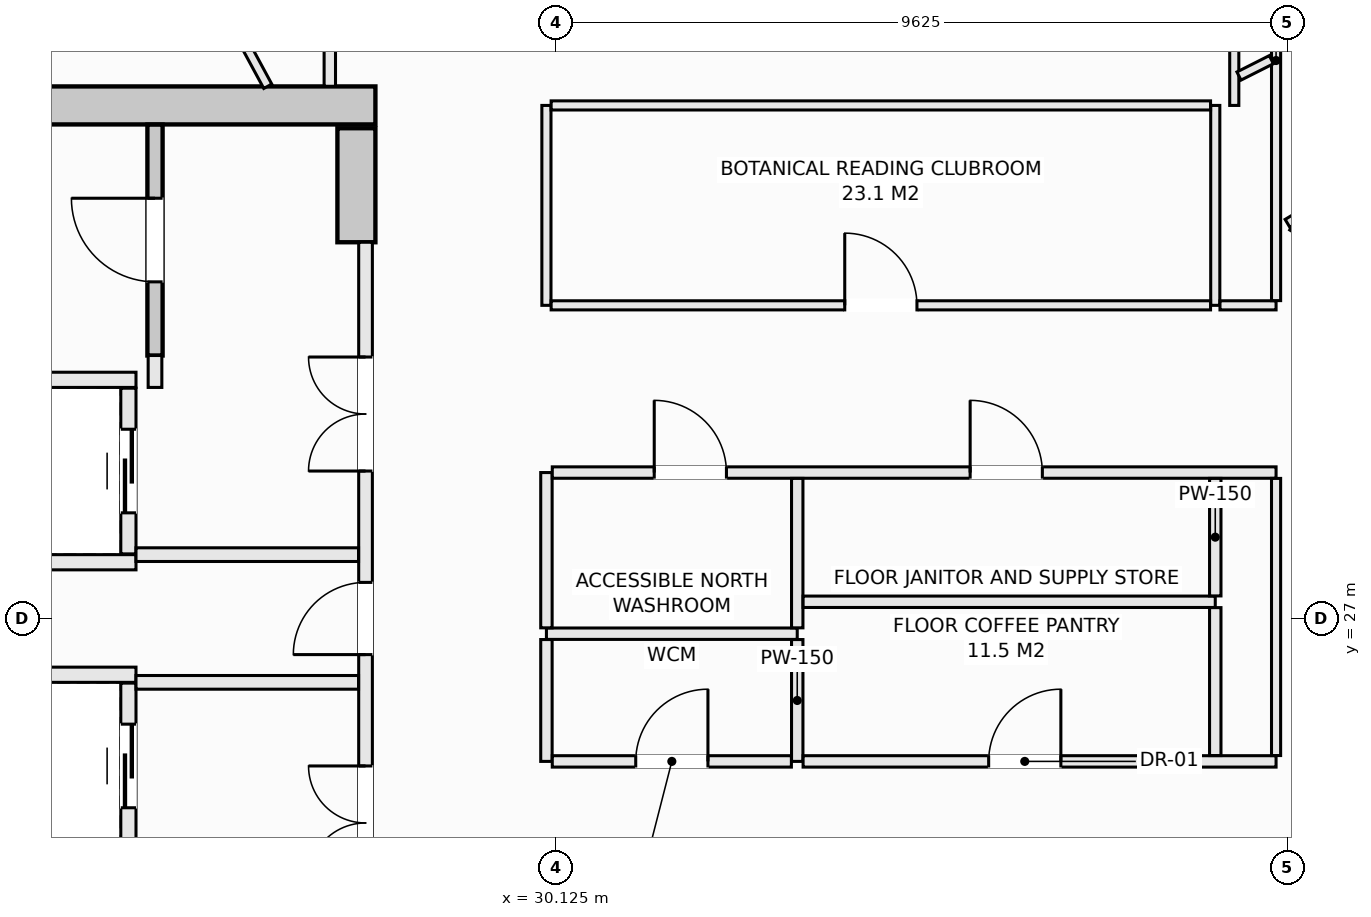
"""IFC4 building model, lengths in metres.
Left out: names, types, materials, properties, quantities, classifications, styles, units other than length and angle.
Written with IfcOpenShell. Run it as: python <this file> out.ifc"""

import sys

from ifc_helpers import new_model, si_unit, direction, frame, frame_2d, origin, place, context, subcontext, project, spatial, rectangle, extrude, element, fill, save


model = new_model("IFC4")
c1 = context("Model", 3, precision=1e-05, world=origin(), true_north=direction((0.0, 1.0)))
c2 = subcontext(c1, "Body", "Model", "MODEL_VIEW")
j1 = project(units=[si_unit("LENGTHUNIT", "METRE"), si_unit("PLANEANGLEUNIT", "RADIAN")], contexts=[c1])
p1 = place(None, origin())
s1 = spatial("IfcSite", under=j1, at=p1, CompositionType="ELEMENT")
p2 = place(p1, origin())
s2 = spatial("IfcBuilding", under=s1, at=p2, CompositionType="ELEMENT")
p3 = place(p2, frame((0.0, 0.0, 232.7)))
s3 = spatial("IfcBuildingStorey", under=s2, at=p3, CompositionType="ELEMENT", Elevation=232.7)
p4 = place(p3, frame((14.25, 33.75, -0.27), z_axis=(0.0, 0.0, 1.0), x_axis=(1.0, 0.0, 0.0)))
e1 = element("IfcWall", 1, at=p4, inside=s3, PredefinedType="SHEAR", context=c2, shape_type="SweptSolid", body=[
    extrude(rectangle(XDim=13.5, YDim=0.5, at=frame_2d((6.75, 0.0))), origin(), (0.0, 0.0, 1.0), 3.3),
])
p5 = place(p3, frame((27.5, 31.95, -0.27), z_axis=(0.0, 0.0, 1.0), x_axis=(0.0, 1.0, 0.0)))
e2 = element("IfcWall", 2, at=p5, inside=s3, PredefinedType="SHEAR", context=c2, shape_type="SweptSolid", body=[
    extrude(rectangle(XDim=1.5, YDim=0.5, at=frame_2d((0.75, 0.0))), origin(), (0.0, 0.0, 1.0), 3.3),
])
p6 = place(p3, frame((24.85, 30.46, -0.27), z_axis=(0.0, 0.0, 1.0), x_axis=(0.0, 1.0, 0.0)))
e3 = element("IfcWall", 3, at=p6, inside=s3, PredefinedType="SHEAR", context=c2, shape_type="SweptSolid", body=[
    extrude(rectangle(XDim=3.038, YDim=0.2, at=frame_2d((1.519, 0.0))), origin(), (0.0, 0.0, 1.0), 3.3),
])
p7 = place(p6, frame((0.969, 0.0, 0.27)))
e4 = element("IfcOpeningElement", 4, at=p7, cuts=e3, PredefinedType="OPENING", context=c2, shape_type="SweptSolid", body=[
    extrude(rectangle(XDim=1.1, YDim=2.15, at=frame_2d((0.55, 1.075))), frame((0.0, 0.11, 0.0), z_axis=(0.0, -1.0, 0.0), x_axis=(1.0, 0.0, 0.0)), (0.0, 0.0, 1.0), 0.22),
])
for number, where, z_axis, x_axis in (
    (5, (22.15, 30.14, 0.0), (0.0, 0.0, 1.0), (1.0, 0.0, 0.0)),
    (6, (22.15, 27.74, 0.0), (0.0, 0.0, 1.0), (1.0, 0.0, 0.0)),
):
    element("IfcWall", number, at=place(p3, frame(where, z_axis=z_axis, x_axis=x_axis)), inside=s3, PredefinedType="SOLIDWALL", context=c2, shape_type="SweptSolid", body=[
        extrude(rectangle(XDim=2.45, YDim=0.2, at=frame_2d((1.225, 0.0))), origin(), (0.0, 0.0, 1.0), 3.03),
    ])
p8 = place(p3, frame((24.5, 27.85, 0.0), z_axis=(0.0, 0.0, 1.0), x_axis=(0.0, 1.0, 0.0)))
e7 = element("IfcWall", 7, at=p8, inside=s3, PredefinedType="SOLIDWALL", context=c2, shape_type="SweptSolid", body=[
    extrude(rectangle(XDim=2.18, YDim=0.2, at=frame_2d((1.09, 0.0))), origin(), (0.0, 0.0, 1.0), 3.03),
])
p9 = place(p8, frame((0.54, 0.0, 0.0)))
e8 = element("IfcOpeningElement", 8, at=p9, cuts=e7, PredefinedType="OPENING", context=c2, shape_type="SweptSolid", body=[
    extrude(rectangle(XDim=1.1, YDim=2.2, at=frame_2d((0.55, 1.1))), frame((0.0, 0.11, 0.0), z_axis=(0.0, -1.0, 0.0), x_axis=(1.0, 0.0, 0.0)), (0.0, 0.0, 1.0), 0.22),
])
p10 = place(p3, frame((22.15, 26.26, 0.0), z_axis=(0.0, 0.0, 1.0), x_axis=(1.0, 0.0, 0.0)))
e9 = element("IfcWall", 9, at=p10, inside=s3, PredefinedType="SOLIDWALL", context=c2, shape_type="SweptSolid", body=[
    extrude(rectangle(XDim=2.45, YDim=0.2, at=frame_2d((1.225, 0.0))), origin(), (0.0, 0.0, 1.0), 3.03),
])
p11 = place(p3, frame((24.5, 23.97, 0.0), z_axis=(0.0, 0.0, 1.0), x_axis=(0.0, 1.0, 0.0)))
e10 = element("IfcWall", 10, at=p11, inside=s3, PredefinedType="SOLIDWALL", context=c2, shape_type="SweptSolid", body=[
    extrude(rectangle(XDim=2.18, YDim=0.2, at=frame_2d((1.09, 0.0))), origin(), (0.0, 0.0, 1.0), 3.03),
])
p12 = place(p11, frame((0.54, 0.0, 0.0)))
e11 = element("IfcOpeningElement", 11, at=p12, cuts=e10, PredefinedType="OPENING", context=c2, shape_type="SweptSolid", body=[
    extrude(rectangle(XDim=1.1, YDim=2.2, at=frame_2d((0.55, 1.1))), frame((0.0, 0.11, 0.0), z_axis=(0.0, -1.0, 0.0), x_axis=(1.0, 0.0, 0.0)), (0.0, 0.0, 1.0), 0.22),
])
p13 = place(p3, frame((24.85, 30.04, 0.0), z_axis=(0.0, 0.0, 1.0), x_axis=(0.0, 1.0, 0.0)))
e12 = element("IfcWall", 12, at=p13, inside=s3, PredefinedType="SOLIDWALL", context=c2, shape_type="SweptSolid", body=[
    extrude(rectangle(XDim=0.42, YDim=0.18, at=frame_2d((0.21, 0.0))), origin(), (0.0, 0.0, 1.0), 3.03),
])
p14 = place(p3, frame((27.62, 22.05, 0.0), z_axis=(0.0, 0.0, 1.0), x_axis=(0.0, 1.0, 0.0)))
e13 = element("IfcWall", 13, at=p14, inside=s3, PredefinedType="SOLIDWALL", context=c2, shape_type="SweptSolid", body=[
    extrude(rectangle(XDim=9.9, YDim=0.18, at=frame_2d((4.95, 0.0))), origin(), (0.0, 0.0, 1.0), 3.03),
])
p15 = place(p14, frame((4.475, 0.0, 0.0)))
e14 = element("IfcOpeningElement", 14, at=p15, cuts=e13, PredefinedType="OPENING", context=c2, shape_type="SweptSolid", body=[
    extrude(rectangle(XDim=0.95, YDim=2.1, at=frame_2d((0.475, 1.05))), frame((0.0, 0.1, 0.0), z_axis=(0.0, -1.0, 0.0), x_axis=(1.0, 0.0, 0.0)), (0.0, 0.0, 1.0), 0.2),
])
p16 = place(p14, frame((6.89, 0.0, 0.0)))
e15 = element("IfcOpeningElement", 15, at=p16, cuts=e13, PredefinedType="OPENING", context=c2, shape_type="SweptSolid", body=[
    extrude(rectangle(XDim=1.5, YDim=2.2, at=frame_2d((0.75, 1.1))), frame((0.0, 0.1, 0.0), z_axis=(0.0, -1.0, 0.0), x_axis=(1.0, 0.0, 0.0)), (0.0, 0.0, 1.0), 0.2),
])
p17 = place(p14, frame((1.51, 0.0, 0.0)))
e16 = element("IfcOpeningElement", 16, at=p17, cuts=e13, PredefinedType="OPENING", context=c2, shape_type="SweptSolid", body=[
    extrude(rectangle(XDim=1.5, YDim=2.2, at=frame_2d((0.75, 1.1))), frame((0.0, 0.1, 0.0), z_axis=(0.0, -1.0, 0.0), x_axis=(1.0, 0.0, 0.0)), (0.0, 0.0, 1.0), 0.2),
])
for number, where, z_axis, x_axis in (
    (17, (24.6, 27.84, 0.0), (0.0, 0.0, 1.0), (1.0, 0.0, 0.0)),
    (18, (24.6, 26.16, 0.0), (0.0, 0.0, 1.0), (1.0, 0.0, 0.0)),
):
    element("IfcWall", number, at=place(p3, frame(where, z_axis=z_axis, x_axis=x_axis)), inside=s3, PredefinedType="SOLIDWALL", context=c2, shape_type="SweptSolid", body=[
        extrude(rectangle(XDim=2.928, YDim=0.18, at=frame_2d((1.464, 0.0))), origin(), (0.0, 0.0, 1.0), 3.03),
    ])
p18 = place(p3, frame((27.15, 34.002, 0.0), z_axis=(0.0, 0.0, 1.0), x_axis=(0.0, 1.0, 0.0)))
e19 = element("IfcWall", 19, at=p18, inside=s3, PredefinedType="PARTITIONING", context=c2, shape_type="SweptSolid", body=[
    extrude(rectangle(XDim=4.198, YDim=0.15, at=frame_2d((2.099, 0.0))), origin(), (0.0, 0.0, 1.0), 3.03),
])
p19 = place(p18, frame((1.998, 0.0, 0.0)))
e20 = element("IfcOpeningElement", 20, at=p19, cuts=e19, PredefinedType="OPENING", context=c2, shape_type="SweptSolid", body=[
    extrude(rectangle(XDim=0.95, YDim=2.1, at=frame_2d((0.475, 1.05))), frame((0.0, 0.085, 0.0), z_axis=(0.0, -1.0, 0.0), x_axis=(1.0, 0.0, 0.0)), (0.0, 0.0, 1.0), 0.17),
])
p20 = place(p3, frame((30.0, 26.8, 0.0), z_axis=(0.0, 0.0, 1.0), x_axis=(1.0, 0.0, 0.0)))
e21 = element("IfcWall", 21, at=p20, inside=s3, PredefinedType="PARTITIONING", context=c2, shape_type="SweptSolid", body=[
    extrude(rectangle(XDim=3.3, YDim=0.15, at=frame_2d((1.65, 0.0))), origin(), (0.0, 0.0, 1.0), 3.03),
])
p21 = place(p3, frame((30.0, 25.12, 0.0), z_axis=(0.0, 0.0, 1.0), x_axis=(0.0, 1.0, 0.0)))
e22 = element("IfcWall", 22, at=p21, inside=s3, PredefinedType="PARTITIONING", context=c2, shape_type="SweptSolid", body=[
    extrude(rectangle(XDim=1.603, YDim=0.15, at=frame_2d((0.801, 0.0))), origin(), (0.0, 0.0, 1.0), 3.03),
])
p22 = place(p3, frame((30.0, 26.877, 0.0), z_axis=(0.0, 0.0, 1.0), x_axis=(0.0, 1.0, 0.0)))
e23 = element("IfcWall", 23, at=p22, inside=s3, PredefinedType="PARTITIONING", context=c2, shape_type="SweptSolid", body=[
    extrude(rectangle(XDim=2.043, YDim=0.15, at=frame_2d((1.021, 0.0))), origin(), (0.0, 0.0, 1.0), 3.03),
])
p23 = place(p3, frame((30.0, 31.12, 0.0), z_axis=(0.0, 0.0, 1.0), x_axis=(0.0, 1.0, 0.0)))
e24 = element("IfcWall", 24, at=p23, inside=s3, PredefinedType="PARTITIONING", context=c2, shape_type="SweptSolid", body=[
    extrude(rectangle(XDim=2.63, YDim=0.12, at=frame_2d((1.315, 0.0))), origin(), (0.0, 0.0, 1.0), 3.03),
])
p24 = place(p3, frame((30.077, 28.92, 0.0), z_axis=(0.0, 0.0, 1.0), x_axis=(1.0, 0.0, 0.0)))
e25 = element("IfcWall", 25, at=p24, inside=s3, PredefinedType="PARTITIONING", context=c2, shape_type="SweptSolid", body=[
    extrude(rectangle(XDim=9.523, YDim=0.15, at=frame_2d((4.762, 0.0))), origin(), (0.0, 0.0, 1.0), 3.03),
])
p25 = place(p24, frame((1.342, 0.0, 0.0)))
e26 = element("IfcOpeningElement", 26, at=p25, cuts=e25, PredefinedType="OPENING", context=c2, shape_type="SweptSolid", body=[
    extrude(rectangle(XDim=0.95, YDim=2.1, at=frame_2d((0.475, 1.05))), frame((0.0, 0.085, 0.0), z_axis=(0.0, -1.0, 0.0), x_axis=(1.0, 0.0, 0.0)), (0.0, 0.0, 1.0), 0.17),
])
p26 = place(p24, frame((5.498, 0.0, 0.0)))
e27 = element("IfcOpeningElement", 27, at=p26, cuts=e25, PredefinedType="OPENING", context=c2, shape_type="SweptSolid", body=[
    extrude(rectangle(XDim=0.95, YDim=2.1, at=frame_2d((0.475, 1.05))), frame((0.0, 0.085, 0.0), z_axis=(0.0, -1.0, 0.0), x_axis=(1.0, 0.0, 0.0)), (0.0, 0.0, 1.0), 0.17),
])
p27 = place(p3, frame((33.3, 25.12, 0.0), z_axis=(0.0, 0.0, 1.0), x_axis=(0.0, 1.0, 0.0)))
e28 = element("IfcWall", 28, at=p27, inside=s3, PredefinedType="PARTITIONING", context=c2, shape_type="SweptSolid", body=[
    extrude(rectangle(XDim=1.603, YDim=0.15, at=frame_2d((0.801, 0.0))), origin(), (0.0, 0.0, 1.0), 3.03),
])
p28 = place(p3, frame((33.3, 26.877, 0.0), z_axis=(0.0, 0.0, 1.0), x_axis=(0.0, 1.0, 0.0)))
e29 = element("IfcWall", 29, at=p28, inside=s3, PredefinedType="PARTITIONING", context=c2, shape_type="SweptSolid", body=[
    extrude(rectangle(XDim=1.966, YDim=0.15, at=frame_2d((0.983, 0.0))), origin(), (0.0, 0.0, 1.0), 3.03),
])
p29 = place(p3, frame((30.077, 25.12, 0.0), z_axis=(0.0, 0.0, 1.0), x_axis=(1.0, 0.0, 0.0)))
e30 = element("IfcWall", 30, at=p29, inside=s3, PredefinedType="PARTITIONING", context=c2, shape_type="SweptSolid", body=[
    extrude(rectangle(XDim=3.146, YDim=0.15, at=frame_2d((1.573, 0.0))), origin(), (0.0, 0.0, 1.0), 3.03),
])
p30 = place(p29, frame((1.098, 0.0, 0.0)))
e31 = element("IfcOpeningElement", 31, at=p30, cuts=e30, PredefinedType="OPENING", context=c2, shape_type="SweptSolid", body=[
    extrude(rectangle(XDim=0.95, YDim=2.1, at=frame_2d((0.475, 1.05))), frame((0.0, 0.085, 0.0), z_axis=(0.0, -1.0, 0.0), x_axis=(1.0, 0.0, 0.0)), (0.0, 0.0, 1.0), 0.17),
])
p31 = place(p3, frame((33.377, 25.12, 0.0), z_axis=(0.0, 0.0, 1.0), x_axis=(1.0, 0.0, 0.0)))
e32 = element("IfcWall", 32, at=p31, inside=s3, PredefinedType="PARTITIONING", context=c2, shape_type="SweptSolid", body=[
    extrude(rectangle(XDim=6.223, YDim=0.15, at=frame_2d((3.112, 0.0))), origin(), (0.0, 0.0, 1.0), 3.03),
])
p32 = place(p31, frame((2.441, 0.0, 0.0)))
e33 = element("IfcOpeningElement", 33, at=p32, cuts=e32, PredefinedType="OPENING", context=c2, shape_type="SweptSolid", body=[
    extrude(rectangle(XDim=0.95, YDim=2.1, at=frame_2d((0.475, 1.05))), frame((0.0, 0.085, 0.0), z_axis=(0.0, -1.0, 0.0), x_axis=(1.0, 0.0, 0.0)), (0.0, 0.0, 1.0), 0.17),
])
p33 = place(p3, frame((33.377, 27.22, 0.0), z_axis=(0.0, 0.0, 1.0), x_axis=(1.0, 0.0, 0.0)))
e34 = element("IfcWall", 34, at=p33, inside=s3, PredefinedType="PARTITIONING", context=c2, shape_type="SweptSolid", body=[
    extrude(rectangle(XDim=5.423, YDim=0.15, at=frame_2d((2.711, 0.0))), origin(), (0.0, 0.0, 1.0), 3.03),
])
p34 = place(p3, frame((38.8, 25.197, 0.0), z_axis=(0.0, 0.0, 1.0), x_axis=(0.0, 1.0, 0.0)))
e35 = element("IfcWall", 35, at=p34, inside=s3, PredefinedType="PARTITIONING", context=c2, shape_type="SweptSolid", body=[
    extrude(rectangle(XDim=1.946, YDim=0.15, at=frame_2d((0.973, 0.0))), origin(), (0.0, 0.0, 1.0), 3.03),
])
p35 = place(p3, frame((38.8, 27.297, 0.0), z_axis=(0.0, 0.0, 1.0), x_axis=(0.0, 1.0, 0.0)))
e36 = element("IfcWall", 36, at=p35, inside=s3, PredefinedType="PARTITIONING", context=c2, shape_type="SweptSolid", body=[
    extrude(rectangle(XDim=1.546, YDim=0.15, at=frame_2d((0.773, 0.0))), origin(), (0.0, 0.0, 1.0), 3.03),
])
p36 = place(p3, frame((38.8, 31.12, 0.0), z_axis=(0.0, 0.0, 1.0), x_axis=(0.0, 1.0, 0.0)))
e37 = element("IfcWall", 37, at=p36, inside=s3, PredefinedType="PARTITIONING", context=c2, shape_type="SweptSolid", body=[
    extrude(rectangle(XDim=2.63, YDim=0.12, at=frame_2d((1.315, 0.0))), origin(), (0.0, 0.0, 1.0), 3.03),
])
p37 = place(p3, frame((30.062, 31.12, 0.0), z_axis=(0.0, 0.0, 1.0), x_axis=(1.0, 0.0, 0.0)))
e38 = element("IfcWall", 38, at=p37, inside=s3, PredefinedType="PARTITIONING", context=c2, shape_type="SweptSolid", body=[
    extrude(rectangle(XDim=8.676, YDim=0.12, at=frame_2d((4.338, 0.0))), origin(), (0.0, 0.0, 1.0), 3.03),
])
p38 = place(p37, frame((3.863, 0.0, 0.0)))
e39 = element("IfcOpeningElement", 39, at=p38, cuts=e38, PredefinedType="OPENING", context=c2, shape_type="SweptSolid", body=[
    extrude(rectangle(XDim=0.95, YDim=2.1, at=frame_2d((0.475, 1.05))), frame((0.0, 0.07, 0.0), z_axis=(0.0, -1.0, 0.0), x_axis=(1.0, 0.0, 0.0)), (0.0, 0.0, 1.0), 0.14),
])
p39 = place(p3, frame((38.862, 31.12, 0.0), z_axis=(0.0, 0.0, 1.0), x_axis=(1.0, 0.0, 0.0)))
e40 = element("IfcWall", 40, at=p39, inside=s3, PredefinedType="PARTITIONING", context=c2, shape_type="SweptSolid", body=[
    extrude(rectangle(XDim=0.738, YDim=0.12, at=frame_2d((0.369, 0.0))), origin(), (0.0, 0.0, 1.0), 3.03),
])
p40 = place(p3, frame((30.062, 33.75, 0.0), z_axis=(0.0, 0.0, 1.0), x_axis=(1.0, 0.0, 0.0)))
e41 = element("IfcWall", 41, at=p40, inside=s3, PredefinedType="PARTITIONING", context=c2, shape_type="SweptSolid", body=[
    extrude(rectangle(XDim=8.676, YDim=0.12, at=frame_2d((4.338, 0.0))), origin(), (0.0, 0.0, 1.0), 3.03),
])
p41 = place(p3, frame((39.05, 33.75, 0.0), z_axis=(0.0, 0.0, 1.0), x_axis=(0.0, 1.0, 0.0)))
e42 = element("IfcWall", 42, at=p41, inside=s3, PredefinedType="PARTITIONING", context=c2, shape_type="SweptSolid", body=[
    extrude(rectangle(XDim=1.938, YDim=0.12, at=frame_2d((0.969, 0.0))), origin(), (0.0, 0.0, 1.0), 3.03),
])
p42 = place(p3, frame((39.6, 25.197, 0.0), z_axis=(0.0, 0.0, 1.0), x_axis=(0.0, 1.0, 0.0)))
e43 = element("IfcWall", 43, at=p42, inside=s3, PredefinedType="PARTITIONING", context=c2, shape_type="SweptSolid", body=[
    extrude(rectangle(XDim=3.646, YDim=0.12, at=frame_2d((1.823, 0.0))), origin(), (0.0, 0.0, 1.0), 3.03),
])
p43 = place(p3, frame((39.6, 31.182, 0.0), z_axis=(0.0, 0.0, 1.0), x_axis=(0.0, 1.0, 0.0)))
e44 = element("IfcWall", 44, at=p43, inside=s3, PredefinedType="PARTITIONING", context=c2, shape_type="SweptSolid", body=[
    extrude(rectangle(XDim=6.318, YDim=0.12, at=frame_2d((3.159, 0.0))), origin(), (0.0, 0.0, 1.0), 3.03),
])
p44 = place(p3, frame((39.75, 32.199, 0.0), z_axis=(0.0, 0.0, 1.0), x_axis=(0.857702120906, 0.514146935996, 0.0)))
e45 = element("IfcWall", 45, at=p44, inside=s3, PredefinedType="PARTITIONING", context=c2, shape_type="SweptSolid", body=[
    extrude(rectangle(XDim=1.441, YDim=0.12, at=frame_2d((0.721, 0.0))), origin(), (0.0, 0.0, 1.0), 3.03),
])
p45 = place(p3, frame((39.81, 32.163, 0.0), z_axis=(0.0, 0.0, 1.0), x_axis=(0.858011245414, -0.513630901273, 0.0)))
e46 = element("IfcWall", 46, at=p45, inside=s3, PredefinedType="PARTITIONING", context=c2, shape_type="SweptSolid", body=[
    extrude(rectangle(XDim=1.37, YDim=0.12, at=frame_2d((0.685, 0.0))), origin(), (0.0, 0.0, 1.0), 3.03),
])
p46 = place(p3, frame((39.112, 34.137, 0.0), z_axis=(0.0, 0.0, 1.0), x_axis=(0.892681104984, 0.450688855869, 0.0)))
e47 = element("IfcWall", 47, at=p46, inside=s3, PredefinedType="PARTITIONING", context=c2, shape_type="SweptSolid", body=[
    extrude(rectangle(XDim=0.477, YDim=0.12, at=frame_2d((0.239, 0.0))), origin(), (0.0, 0.0, 1.0), 3.03),
])
p47 = place(p3, frame((25.749, 35.083, 0.0), z_axis=(0.0, 0.0, 1.0), x_axis=(0.476052805352, -0.879416696746, 0.0)))
e48 = element("IfcWall", 48, at=p47, inside=s3, PredefinedType="PARTITIONING", context=c2, shape_type="SweptSolid", body=[
    extrude(rectangle(XDim=1.229, YDim=0.12, at=frame_2d((0.615, 0.0))), origin(), (0.0, 0.0, 1.0), 3.03),
])
p48 = place(p7, origin())
e49 = element("IfcDoor", 49, at=p48, inside=s3, OperationType="SINGLE_SWING_RIGHT", PredefinedType="DOOR", context=c2, shape_type="SweptSolid", body=[
    extrude(rectangle(XDim=1.1, YDim=2.15, at=frame_2d((0.55, 1.075))), frame((0.0, 0.025, 0.0), z_axis=(0.0, -1.0, 0.0), x_axis=(1.0, 0.0, 0.0)), (0.0, 0.0, 1.0), 0.05),
])
fill(e4, e49)
p49 = place(p9, origin())
e50 = element("IfcDoor", 50, at=p49, inside=s3, OperationType="SLIDING_TO_LEFT", PredefinedType="DOOR", context=c2, shape_type="SweptSolid", body=[
    extrude(rectangle(XDim=1.1, YDim=2.2, at=frame_2d((0.55, 1.1))), frame((0.0, 0.025, 0.0), z_axis=(0.0, -1.0, 0.0), x_axis=(1.0, 0.0, 0.0)), (0.0, 0.0, 1.0), 0.05),
])
fill(e8, e50)
p50 = place(p12, origin())
e51 = element("IfcDoor", 51, at=p50, inside=s3, OperationType="SLIDING_TO_LEFT", PredefinedType="DOOR", context=c2, shape_type="SweptSolid", body=[
    extrude(rectangle(XDim=1.1, YDim=2.2, at=frame_2d((0.55, 1.1))), frame((0.0, 0.025, 0.0), z_axis=(0.0, -1.0, 0.0), x_axis=(1.0, 0.0, 0.0)), (0.0, 0.0, 1.0), 0.05),
])
fill(e11, e51)
p51 = place(p15, origin())
e52 = element("IfcDoor", 52, at=p51, inside=s3, OperationType="SINGLE_SWING_LEFT", PredefinedType="DOOR", context=c2, shape_type="SweptSolid", body=[
    extrude(rectangle(XDim=0.95, YDim=2.1, at=frame_2d((0.475, 1.05))), frame((0.0, 0.025, 0.0), z_axis=(0.0, -1.0, 0.0), x_axis=(1.0, 0.0, 0.0)), (0.0, 0.0, 1.0), 0.05),
])
fill(e14, e52)
p52 = place(p16, origin())
e53 = element("IfcDoor", 53, at=p52, inside=s3, OperationType="DOUBLE_DOOR_SINGLE_SWING", PredefinedType="DOOR", context=c2, shape_type="SweptSolid", body=[
    extrude(rectangle(XDim=1.5, YDim=2.2, at=frame_2d((0.75, 1.1))), frame((0.0, 0.025, 0.0), z_axis=(0.0, -1.0, 0.0), x_axis=(1.0, 0.0, 0.0)), (0.0, 0.0, 1.0), 0.05),
])
fill(e15, e53)
p53 = place(p17, origin())
e54 = element("IfcDoor", 54, at=p53, inside=s3, OperationType="DOUBLE_DOOR_SINGLE_SWING", PredefinedType="DOOR", context=c2, shape_type="SweptSolid", body=[
    extrude(rectangle(XDim=1.5, YDim=2.2, at=frame_2d((0.75, 1.1))), frame((0.0, 0.025, 0.0), z_axis=(0.0, -1.0, 0.0), x_axis=(1.0, 0.0, 0.0)), (0.0, 0.0, 1.0), 0.05),
])
fill(e16, e54)
p54 = place(p25, origin())
e55 = element("IfcDoor", 55, at=p54, inside=s3, OperationType="SINGLE_SWING_LEFT", PredefinedType="DOOR", context=c2, shape_type="SweptSolid", body=[
    extrude(rectangle(XDim=0.95, YDim=2.1, at=frame_2d((0.475, 1.05))), frame((0.0, 0.025, 0.0), z_axis=(0.0, -1.0, 0.0), x_axis=(1.0, 0.0, 0.0)), (0.0, 0.0, 1.0), 0.05),
])
fill(e26, e55)
p55 = place(p30, origin())
e56 = element("IfcDoor", 56, at=p55, inside=s3, OperationType="SINGLE_SWING_RIGHT", PredefinedType="DOOR", context=c2, shape_type="SweptSolid", body=[
    extrude(rectangle(XDim=0.95, YDim=2.1, at=frame_2d((0.475, 1.05))), frame((0.0, 0.025, 0.0), z_axis=(0.0, -1.0, 0.0), x_axis=(1.0, 0.0, 0.0)), (0.0, 0.0, 1.0), 0.05),
])
fill(e31, e56)
p56 = place(p26, origin())
e57 = element("IfcDoor", 57, at=p56, inside=s3, OperationType="SINGLE_SWING_LEFT", PredefinedType="DOOR", context=c2, shape_type="SweptSolid", body=[
    extrude(rectangle(XDim=0.95, YDim=2.1, at=frame_2d((0.475, 1.05))), frame((0.0, 0.025, 0.0), z_axis=(0.0, -1.0, 0.0), x_axis=(1.0, 0.0, 0.0)), (0.0, 0.0, 1.0), 0.05),
])
fill(e27, e57)
p57 = place(p32, origin())
e58 = element("IfcDoor", 58, at=p57, inside=s3, OperationType="SINGLE_SWING_RIGHT", PredefinedType="DOOR", context=c2, shape_type="SweptSolid", body=[
    extrude(rectangle(XDim=0.95, YDim=2.1, at=frame_2d((0.475, 1.05))), frame((0.0, 0.025, 0.0), z_axis=(0.0, -1.0, 0.0), x_axis=(1.0, 0.0, 0.0)), (0.0, 0.0, 1.0), 0.05),
])
fill(e33, e58)
p58 = place(p38, origin())
e59 = element("IfcDoor", 59, at=p58, inside=s3, OperationType="SINGLE_SWING_LEFT", PredefinedType="DOOR", context=c2, shape_type="SweptSolid", body=[
    extrude(rectangle(XDim=0.95, YDim=2.1, at=frame_2d((0.475, 1.05))), frame((0.0, 0.025, 0.0), z_axis=(0.0, -1.0, 0.0), x_axis=(1.0, 0.0, 0.0)), (0.0, 0.0, 1.0), 0.05),
])
fill(e39, e59)
save(model, sys.argv[1])
